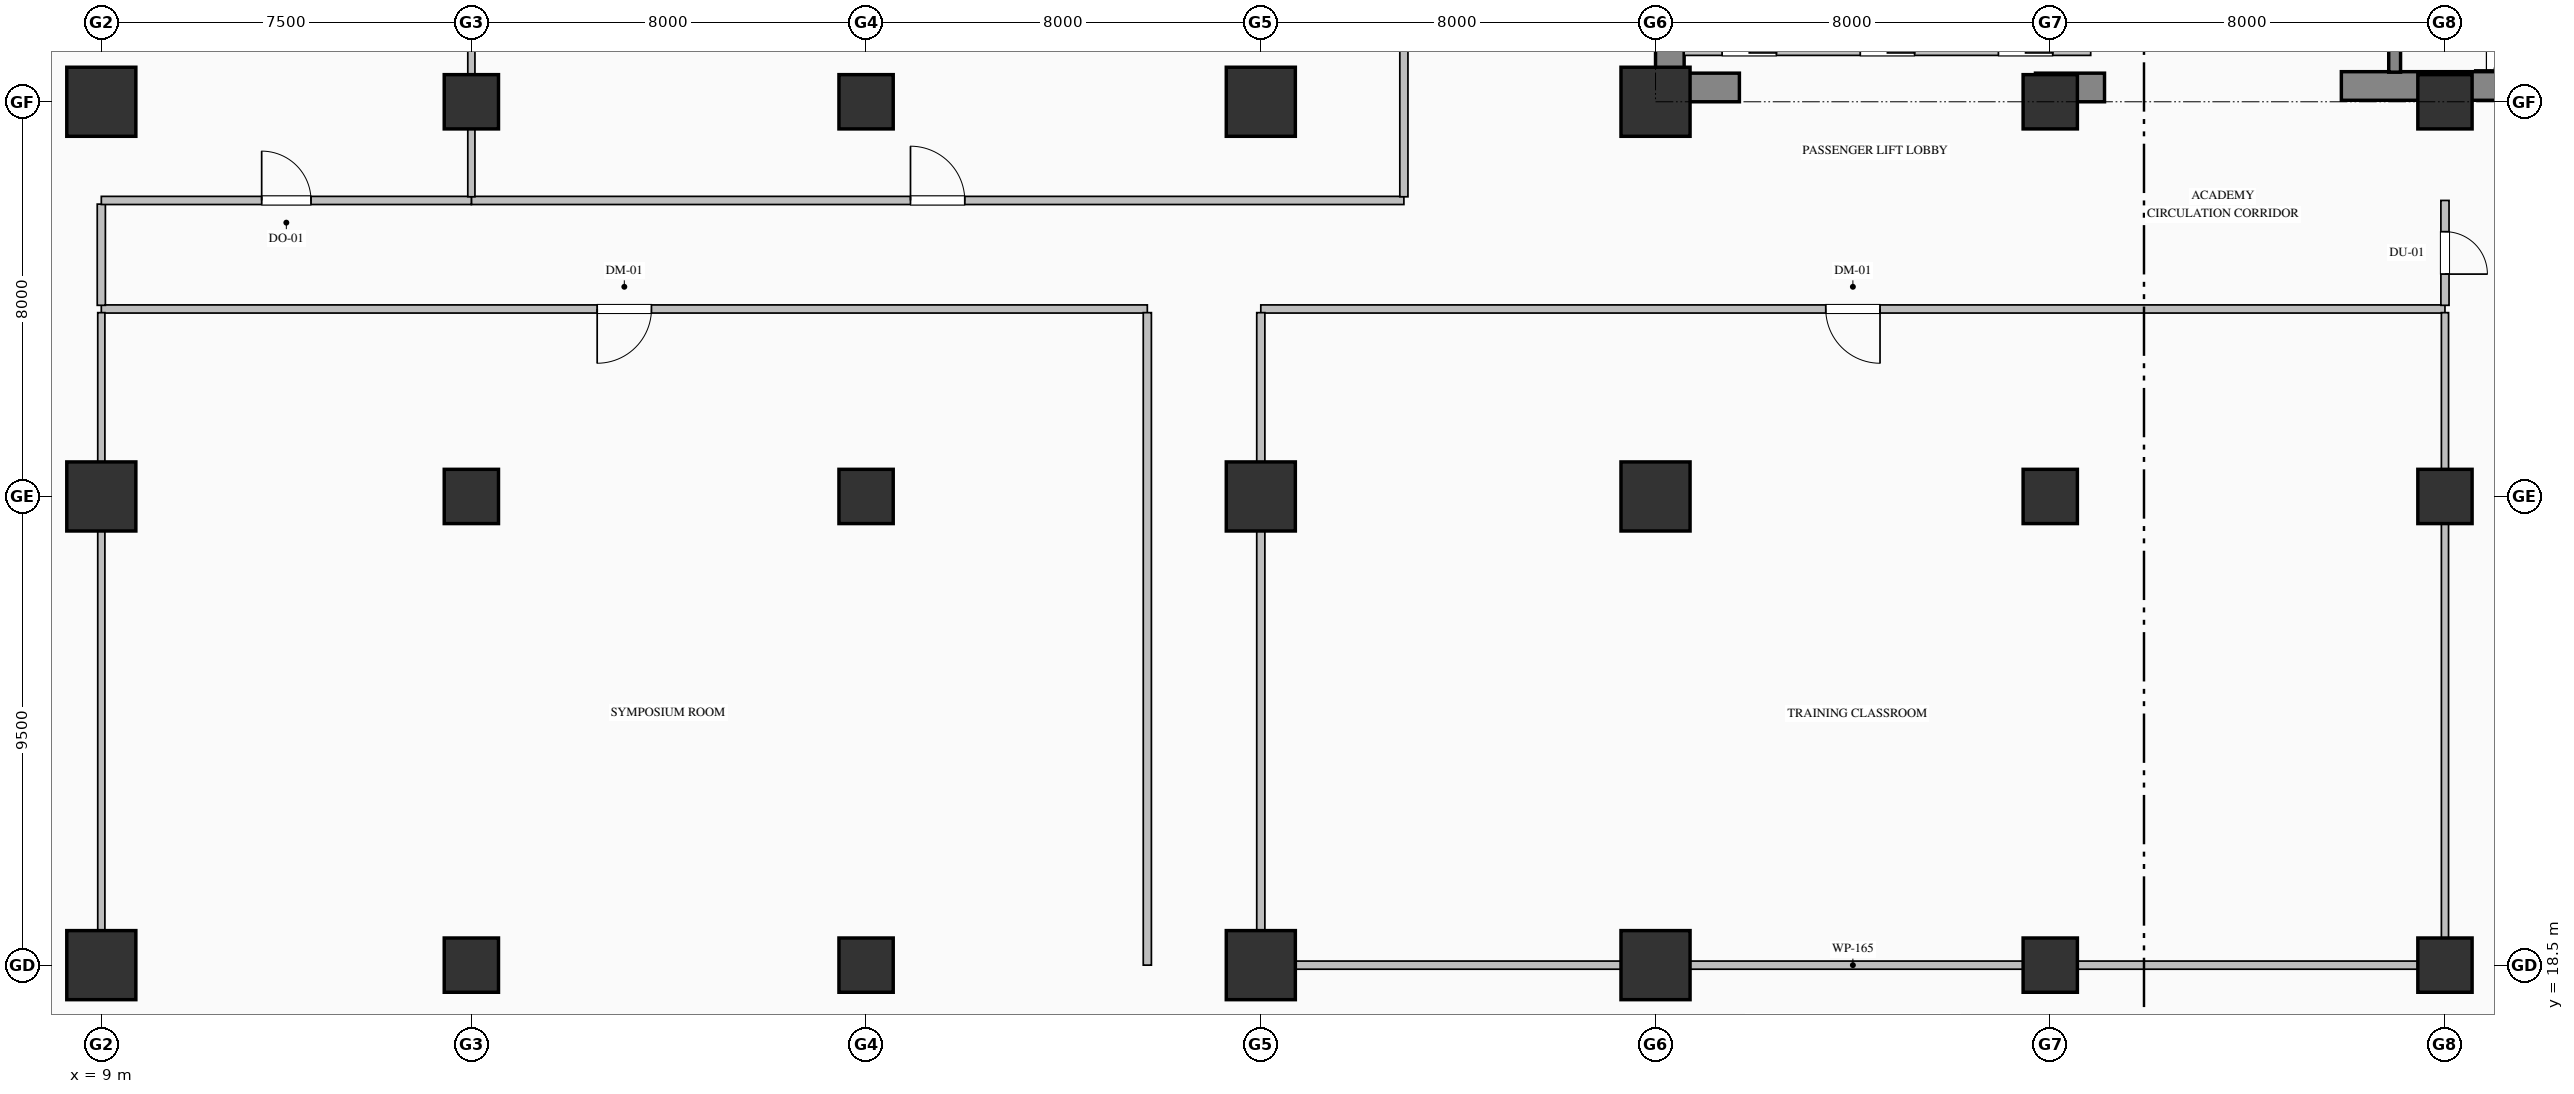
"""IFC4 building model, lengths in metres.
Left out: names, types, materials, properties, quantities, classifications, styles, units other than length and angle.
Written with IfcOpenShell. Run it as: python <this file> out.ifc"""

import sys

from ifc_helpers import new_model, si_unit, direction, frame, frame_2d, origin, origin_2d, place, context, subcontext, project, spatial, rectangle, hollow_rectangle, extrude, element, fill, save


model = new_model("IFC4")
c1 = context("Model", 3, precision=1e-05, world=origin(), true_north=direction((0.0, 1.0)))
c2 = subcontext(c1, "Body", "Model", "MODEL_VIEW")
j1 = project(units=[si_unit("LENGTHUNIT", "METRE"), si_unit("PLANEANGLEUNIT", "RADIAN")], contexts=[c1])
p1 = place(None, origin())
s1 = spatial("IfcSite", under=j1, at=p1, CompositionType="ELEMENT")
p2 = place(p1, origin())
s2 = spatial("IfcBuilding", under=s1, at=p2, CompositionType="ELEMENT")
p3 = place(p2, frame((0.0, 0.0, 17.4)))
s3 = spatial("IfcBuildingStorey", under=s2, at=p3, CompositionType="ELEMENT", Elevation=17.4)
p4 = place(p3, frame((40.79, 36.58, 0.0), z_axis=(0.0, 0.0, 1.0), x_axis=(0.0, 1.0, 0.0)))
e1 = element("IfcWall", 1, at=p4, inside=s3, PredefinedType="SHEAR", context=c2, shape_type="SweptSolid", body=[
    extrude(rectangle(XDim=7.82, YDim=0.58, at=frame_2d((3.91, 0.0))), origin(), (0.0, 0.0, 1.0), 5.14),
])
p5 = place(p3, frame((40.5, 36.29, 0.0), z_axis=(0.0, 0.0, 1.0), x_axis=(1.0, 0.0, 0.0)))
e2 = element("IfcWall", 2, at=p5, inside=s3, PredefinedType="SHEAR", context=c2, shape_type="SweptSolid", body=[
    extrude(rectangle(XDim=1.7, YDim=0.58, at=frame_2d((0.85, 0.0))), origin(), (0.0, 0.0, 1.0), 5.14),
])
p6 = place(p3, frame((48.2, 36.29, 0.0), z_axis=(0.0, 0.0, 1.0), x_axis=(1.0, 0.0, 0.0)))
e3 = element("IfcWall", 3, at=p6, inside=s3, PredefinedType="SHEAR", context=c2, shape_type="SweptSolid", body=[
    extrude(rectangle(XDim=1.4, YDim=0.58, at=frame_2d((0.7, 0.0))), origin(), (0.0, 0.0, 1.0), 5.14),
])
p7 = place(p3, frame((54.4, 36.32, 0.0), z_axis=(0.0, 0.0, 1.0), x_axis=(1.0, 0.0, 0.0)))
e4 = element("IfcWall", 4, at=p7, inside=s3, PredefinedType="SHEAR", context=c2, shape_type="SweptSolid", body=[
    extrude(rectangle(XDim=9.6, YDim=0.58, at=frame_2d((4.8, 0.0))), origin(), (0.0, 0.0, 1.0), 5.4),
])
for number, where, z_axis, x_axis in (
    (5, (9.0, 18.5, 0.0), (0.0, 0.0, 1.0), (1.0, 0.0, 0.0)),
    (6, (9.0, 28.0, 0.0), (0.0, 0.0, 1.0), (1.0, 0.0, 0.0)),
    (7, (9.0, 36.0, 0.0), (0.0, 0.0, 1.0), (1.0, 0.0, 0.0)),
):
    element("IfcColumn", number, at=place(p3, frame(where, z_axis=z_axis, x_axis=x_axis)), inside=s3, PredefinedType="COLUMN", context=c2, shape_type="SweptSolid", body=[
        extrude(hollow_rectangle(XDim=1.4, YDim=1.4, WallThickness=0.05, at=origin_2d()), origin(), (0.0, 0.0, 1.0), 5.4),
    ])
for number, where, z_axis, x_axis in (
    (8, (16.5, 18.5, -0.45), (0.0, 0.0, 1.0), (1.0, 0.0, 0.0)),
    (9, (16.5, 28.0, -0.45), (0.0, 0.0, 1.0), (1.0, 0.0, 0.0)),
    (10, (16.5, 36.0, -0.45), (0.0, 0.0, 1.0), (1.0, 0.0, 0.0)),
    (11, (24.5, 18.5, -0.45), (0.0, 0.0, 1.0), (1.0, 0.0, 0.0)),
    (12, (24.5, 28.0, -0.45), (0.0, 0.0, 1.0), (1.0, 0.0, 0.0)),
    (13, (24.5, 36.0, -0.45), (0.0, 0.0, 1.0), (1.0, 0.0, 0.0)),
):
    element("IfcColumn", number, at=place(p3, frame(where, z_axis=z_axis, x_axis=x_axis)), inside=s3, PredefinedType="COLUMN", context=c2, shape_type="SweptSolid", body=[
        extrude(rectangle(XDim=1.1, YDim=1.1, at=origin_2d()), origin(), (0.0, 0.0, 1.0), 5.85),
    ])
for number, where, z_axis, x_axis in (
    (14, (32.5, 18.5, 0.0), (0.0, 0.0, 1.0), (1.0, 0.0, 0.0)),
    (15, (32.5, 28.0, 0.0), (0.0, 0.0, 1.0), (1.0, 0.0, 0.0)),
    (16, (32.5, 36.0, 0.0), (0.0, 0.0, 1.0), (1.0, 0.0, 0.0)),
    (17, (40.5, 18.5, 0.0), (0.0, 0.0, 1.0), (1.0, 0.0, 0.0)),
    (18, (40.5, 28.0, 0.0), (0.0, 0.0, 1.0), (1.0, 0.0, 0.0)),
    (19, (40.5, 36.0, 0.0), (0.0, 0.0, 1.0), (1.0, 0.0, 0.0)),
):
    element("IfcColumn", number, at=place(p3, frame(where, z_axis=z_axis, x_axis=x_axis)), inside=s3, PredefinedType="COLUMN", context=c2, shape_type="SweptSolid", body=[
        extrude(hollow_rectangle(XDim=1.4, YDim=1.4, WallThickness=0.05, at=origin_2d()), origin(), (0.0, 0.0, 1.0), 5.4),
    ])
for number, where, z_axis, x_axis in (
    (20, (48.5, 18.5, 0.0), (0.0, 0.0, 1.0), (1.0, 0.0, 0.0)),
    (21, (48.5, 28.0, 0.0), (0.0, 0.0, 1.0), (1.0, 0.0, 0.0)),
    (22, (48.5, 36.0, 0.0), (0.0, 0.0, 1.0), (1.0, 0.0, 0.0)),
    (23, (56.5, 18.5, 0.0), (0.0, 0.0, 1.0), (1.0, 0.0, 0.0)),
    (24, (56.5, 28.0, 0.0), (0.0, 0.0, 1.0), (1.0, 0.0, 0.0)),
    (25, (56.5, 36.0, 0.0), (0.0, 0.0, 1.0), (1.0, 0.0, 0.0)),
):
    element("IfcColumn", number, at=place(p3, frame(where, z_axis=z_axis, x_axis=x_axis)), inside=s3, PredefinedType="COLUMN", context=c2, shape_type="SweptSolid", body=[
        extrude(rectangle(XDim=1.1, YDim=1.1, at=origin_2d()), origin(), (0.0, 0.0, 1.0), 5.4),
    ])
p8 = place(p3, frame((55.48, 39.75, 0.0), z_axis=(0.0, 0.0, 1.0), x_axis=(0.0, -1.0, 0.0)))
e26 = element("IfcWall", 26, at=p8, inside=s3, PredefinedType="SOLIDWALL", context=c2, shape_type="SweptSolid", body=[
    extrude(rectangle(XDim=3.15, YDim=0.24, at=frame_2d((1.575, 0.0))), origin(), (0.0, 0.0, 1.0), 5.4),
])
p9 = place(p8, frame((1.0, 0.0, 0.0)))
e27 = element("IfcOpeningElement", 27, at=p9, cuts=e26, PredefinedType="OPENING", context=c2, shape_type="SweptSolid", body=[
    extrude(rectangle(XDim=1.15, YDim=2.2, at=frame_2d((0.575, 1.1))), frame((0.0, 0.13, 0.0), z_axis=(0.0, -1.0, 0.0), x_axis=(1.0, 0.0, 0.0)), (0.0, 0.0, 1.0), 0.26),
])
p10 = place(p3, frame((49.32, 37.05, 0.0), z_axis=(0.0, 0.0, 1.0), x_axis=(-1.0, 0.0, 0.0)))
e28 = element("IfcWall", 28, at=p10, inside=s3, PredefinedType="PARTITIONING", context=c2, shape_type="SweptSolid", body=[
    extrude(rectangle(XDim=8.24, YDim=0.22, at=frame_2d((4.12, 0.0))), origin(), (0.0, 0.0, 1.0), 5.14),
])
p11 = place(p10, frame((6.37, 0.0, 0.0)))
e29 = element("IfcOpeningElement", 29, at=p11, cuts=e28, PredefinedType="OPENING", context=c2, shape_type="SweptSolid", body=[
    extrude(rectangle(XDim=1.1, YDim=2.2, at=frame_2d((0.55, 1.1))), frame((0.0, 0.12, 0.0), z_axis=(0.0, -1.0, 0.0), x_axis=(1.0, 0.0, 0.0)), (0.0, 0.0, 1.0), 0.24),
])
p12 = place(p10, frame((3.57, 0.0, 0.0)))
e30 = element("IfcOpeningElement", 30, at=p12, cuts=e28, PredefinedType="OPENING", context=c2, shape_type="SweptSolid", body=[
    extrude(rectangle(XDim=1.1, YDim=2.2, at=frame_2d((0.55, 1.1))), frame((0.0, 0.12, 0.0), z_axis=(0.0, -1.0, 0.0), x_axis=(1.0, 0.0, 0.0)), (0.0, 0.0, 1.0), 0.24),
])
p13 = place(p10, frame((0.77, 0.0, 0.0)))
e31 = element("IfcOpeningElement", 31, at=p13, cuts=e28, PredefinedType="OPENING", context=c2, shape_type="SweptSolid", body=[
    extrude(rectangle(XDim=1.1, YDim=2.2, at=frame_2d((0.55, 1.1))), frame((0.0, 0.12, 0.0), z_axis=(0.0, -1.0, 0.0), x_axis=(1.0, 0.0, 0.0)), (0.0, 0.0, 1.0), 0.24),
])
p14 = place(p3, frame((56.5, 31.8, 0.0), z_axis=(0.0, 0.0, 1.0), x_axis=(-1.0, 0.0, 0.0)))
e32 = element("IfcWall", 32, at=p14, inside=s3, PredefinedType="PARTITIONING", context=c2, shape_type="SweptSolid", body=[
    extrude(rectangle(XDim=24.0, YDim=0.165, at=frame_2d((12.0, 0.0))), origin(), (0.0, 0.0, 1.0), 5.14),
])
p15 = place(p14, frame((11.45, 0.0, 0.0)))
e33 = element("IfcOpeningElement", 33, at=p15, cuts=e32, PredefinedType="OPENING", context=c2, shape_type="SweptSolid", body=[
    extrude(rectangle(XDim=1.1, YDim=2.2, at=frame_2d((0.55, 1.1))), frame((0.0, 0.093, 0.0), z_axis=(0.0, -1.0, 0.0), x_axis=(1.0, 0.0, 0.0)), (0.0, 0.0, 1.0), 0.185),
])
p16 = place(p3, frame((30.2, 31.8, 0.0), z_axis=(0.0, 0.0, 1.0), x_axis=(-1.0, 0.0, 0.0)))
e34 = element("IfcWall", 34, at=p16, inside=s3, PredefinedType="PARTITIONING", context=c2, shape_type="SweptSolid", body=[
    extrude(rectangle(XDim=21.2, YDim=0.165, at=frame_2d((10.6, 0.0))), origin(), (0.0, 0.0, 1.0), 5.14),
])
p17 = place(p16, frame((10.05, 0.0, 0.0)))
e35 = element("IfcOpeningElement", 35, at=p17, cuts=e34, PredefinedType="OPENING", context=c2, shape_type="SweptSolid", body=[
    extrude(rectangle(XDim=1.1, YDim=2.2, at=frame_2d((0.55, 1.1))), frame((0.0, 0.093, 0.0), z_axis=(0.0, -1.0, 0.0), x_axis=(1.0, 0.0, 0.0)), (0.0, 0.0, 1.0), 0.185),
])
p18 = place(p3, frame((16.5, 34.0, 0.0), z_axis=(0.0, 0.0, 1.0), x_axis=(1.0, 0.0, 0.0)))
e36 = element("IfcWall", 36, at=p18, inside=s3, PredefinedType="PARTITIONING", context=c2, shape_type="SweptSolid", body=[
    extrude(rectangle(XDim=18.9, YDim=0.165, at=frame_2d((9.45, 0.0))), origin(), (0.0, 0.0, 1.0), 5.14),
])
p19 = place(p18, frame((8.9, 0.0, 0.0)))
e37 = element("IfcOpeningElement", 37, at=p19, cuts=e36, PredefinedType="OPENING", context=c2, shape_type="SweptSolid", body=[
    extrude(rectangle(XDim=1.1, YDim=2.2, at=frame_2d((0.55, 1.1))), frame((0.0, 0.093, 0.0), z_axis=(0.0, -1.0, 0.0), x_axis=(1.0, 0.0, 0.0)), (0.0, 0.0, 1.0), 0.185),
])
p20 = place(p3, frame((56.5, 34.0, 0.0), z_axis=(0.0, 0.0, 1.0), x_axis=(0.0, -1.0, 0.0)))
e38 = element("IfcWall", 38, at=p20, inside=s3, PredefinedType="PARTITIONING", context=c2, shape_type="SweptSolid", body=[
    extrude(rectangle(XDim=2.125, YDim=0.165, at=frame_2d((1.063, 0.0))), origin(), (0.0, 0.0, 1.0), 4.232),
])
p21 = place(p20, frame((0.633, 0.0, 0.0)))
e39 = element("IfcOpeningElement", 39, at=p21, cuts=e38, PredefinedType="OPENING", context=c2, shape_type="SweptSolid", body=[
    extrude(rectangle(XDim=0.86, YDim=2.1, at=frame_2d((0.43, 1.05))), frame((0.0, 0.093, 0.0), z_axis=(0.0, -1.0, 0.0), x_axis=(1.0, 0.0, 0.0)), (0.0, 0.0, 1.0), 0.185),
])
p22 = place(p3, frame((9.0, 31.875, 0.0), z_axis=(0.0, 0.0, 1.0), x_axis=(0.0, 1.0, 0.0)))
e40 = element("IfcWall", 40, at=p22, inside=s3, PredefinedType="PARTITIONING", context=c2, shape_type="SweptSolid", body=[
    extrude(rectangle(XDim=2.051, YDim=0.165, at=frame_2d((1.025, 0.0))), origin(), (0.0, 0.0, 1.0), 4.232),
])
p23 = place(p3, frame((9.0, 34.0, 0.0), z_axis=(0.0, 0.0, 1.0), x_axis=(1.0, 0.0, 0.0)))
e41 = element("IfcWall", 41, at=p23, inside=s3, PredefinedType="PARTITIONING", context=c2, shape_type="SweptSolid", body=[
    extrude(rectangle(XDim=7.5, YDim=0.165, at=frame_2d((3.75, 0.0))), origin(), (0.0, 0.0, 1.0), 5.14),
])
p24 = place(p23, frame((3.25, 0.0, 0.0)))
e42 = element("IfcOpeningElement", 42, at=p24, cuts=e41, PredefinedType="OPENING", context=c2, shape_type="SweptSolid", body=[
    extrude(rectangle(XDim=1.0, YDim=2.15, at=frame_2d((0.5, 1.075))), frame((0.0, 0.093, 0.0), z_axis=(0.0, -1.0, 0.0), x_axis=(1.0, 0.0, 0.0)), (0.0, 0.0, 1.0), 0.185),
])
p25 = place(p3, frame((35.4, 34.074, 0.0), z_axis=(0.0, 0.0, 1.0), x_axis=(0.0, 1.0, 0.0)))
e43 = element("IfcWall", 43, at=p25, inside=s3, PredefinedType="PARTITIONING", context=c2, shape_type="SweptSolid", body=[
    extrude(rectangle(XDim=13.269, YDim=0.165, at=frame_2d((6.634, 0.0))), origin(), (0.0, 0.0, 1.0), 5.14),
])
p26 = place(p3, frame((32.5, 31.726, 0.0), z_axis=(0.0, 0.0, 1.0), x_axis=(0.0, -1.0, 0.0)))
e44 = element("IfcWall", 44, at=p26, inside=s3, PredefinedType="PARTITIONING", context=c2, shape_type="SweptSolid", body=[
    extrude(rectangle(XDim=13.151, YDim=0.165, at=frame_2d((6.576, 0.0))), origin(), (0.0, 0.0, 1.0), 4.232),
])
p27 = place(p3, frame((30.2, 18.5, 0.0), z_axis=(0.0, 0.0, 1.0), x_axis=(0.0, 1.0, 0.0)))
e45 = element("IfcWall", 45, at=p27, inside=s3, PredefinedType="PARTITIONING", context=c2, shape_type="SweptSolid", body=[
    extrude(rectangle(XDim=13.226, YDim=0.165, at=frame_2d((6.613, 0.0))), origin(), (0.0, 0.0, 1.0), 5.14),
])
p28 = place(p3, frame((32.5, 18.5, 0.0), z_axis=(0.0, 0.0, 1.0), x_axis=(1.0, 0.0, 0.0)))
e46 = element("IfcWall", 46, at=p28, inside=s3, PredefinedType="PARTITIONING", context=c2, shape_type="SweptSolid", body=[
    extrude(rectangle(XDim=24.0, YDim=0.165, at=frame_2d((12.0, 0.0))), origin(), (0.0, 0.0, 1.0), 4.232),
])
p29 = place(p3, frame((56.5, 31.726, 0.0), z_axis=(0.0, 0.0, 1.0), x_axis=(0.0, -1.0, 0.0)))
e47 = element("IfcWall", 47, at=p29, inside=s3, PredefinedType="PARTITIONING", context=c2, shape_type="SweptSolid", body=[
    extrude(rectangle(XDim=13.151, YDim=0.145, at=frame_2d((6.576, 0.0))), origin(), (0.0, 0.0, 1.0), 4.232),
])
p30 = place(p3, frame((9.0, 18.5, 0.0), z_axis=(0.0, 0.0, 1.0), x_axis=(0.0, 1.0, 0.0)))
e48 = element("IfcWall", 48, at=p30, inside=s3, PredefinedType="PARTITIONING", context=c2, shape_type="SweptSolid", body=[
    extrude(rectangle(XDim=13.226, YDim=0.145, at=frame_2d((6.613, 0.0))), origin(), (0.0, 0.0, 1.0), 4.232),
])
p31 = place(p3, frame((16.5, 34.074, 0.0), z_axis=(0.0, 0.0, 1.0), x_axis=(0.0, 1.0, 0.0)))
e49 = element("IfcWall", 49, at=p31, inside=s3, PredefinedType="PARTITIONING", context=c2, shape_type="SweptSolid", body=[
    extrude(rectangle(XDim=17.553, YDim=0.145, at=frame_2d((8.777, 0.0))), origin(), (0.0, 0.0, 1.0), 4.232),
])
p32 = place(p15, origin())
e50 = element("IfcDoor", 50, at=p32, inside=s3, OperationType="SINGLE_SWING_LEFT", PredefinedType="DOOR", context=c2, shape_type="SweptSolid", body=[
    extrude(rectangle(XDim=1.1, YDim=2.2, at=frame_2d((0.55, 1.1))), frame((0.0, 0.025, 0.0), z_axis=(0.0, -1.0, 0.0), x_axis=(1.0, 0.0, 0.0)), (0.0, 0.0, 1.0), 0.05),
])
fill(e33, e50)
p33 = place(p17, origin())
e51 = element("IfcDoor", 51, at=p33, inside=s3, OperationType="SINGLE_SWING_RIGHT", PredefinedType="DOOR", context=c2, shape_type="SweptSolid", body=[
    extrude(rectangle(XDim=1.1, YDim=2.2, at=frame_2d((0.55, 1.1))), frame((0.0, 0.025, 0.0), z_axis=(0.0, -1.0, 0.0), x_axis=(1.0, 0.0, 0.0)), (0.0, 0.0, 1.0), 0.05),
])
fill(e35, e51)
p34 = place(p19, origin())
e52 = element("IfcDoor", 52, at=p34, inside=s3, OperationType="SINGLE_SWING_LEFT", PredefinedType="DOOR", context=c2, shape_type="SweptSolid", body=[
    extrude(rectangle(XDim=1.1, YDim=2.2, at=frame_2d((0.55, 1.1))), frame((0.0, 0.025, 0.0), z_axis=(0.0, -1.0, 0.0), x_axis=(1.0, 0.0, 0.0)), (0.0, 0.0, 1.0), 0.05),
])
fill(e37, e52)
p35 = place(p21, origin())
e53 = element("IfcDoor", 53, at=p35, inside=s3, OperationType="SINGLE_SWING_RIGHT", PredefinedType="DOOR", context=c2, shape_type="SweptSolid", body=[
    extrude(rectangle(XDim=0.86, YDim=2.1, at=frame_2d((0.43, 1.05))), frame((0.0, 0.025, 0.0), z_axis=(0.0, -1.0, 0.0), x_axis=(1.0, 0.0, 0.0)), (0.0, 0.0, 1.0), 0.05),
])
fill(e39, e53)
p36 = place(p24, origin())
e54 = element("IfcDoor", 54, at=p36, inside=s3, OperationType="SINGLE_SWING_LEFT", PredefinedType="DOOR", context=c2, shape_type="SweptSolid", body=[
    extrude(rectangle(XDim=1.0, YDim=2.15, at=frame_2d((0.5, 1.075))), frame((0.0, 0.025, 0.0), z_axis=(0.0, -1.0, 0.0), x_axis=(1.0, 0.0, 0.0)), (0.0, 0.0, 1.0), 0.05),
])
fill(e42, e54)
save(model, sys.argv[1])
